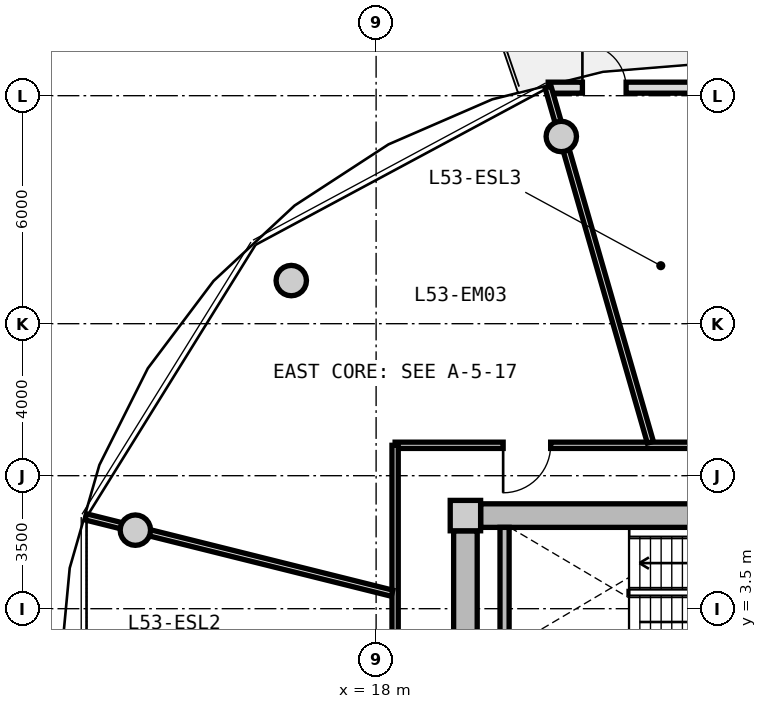
"""IFC4 building model, lengths in metres.
Left out: names, types, materials, properties, quantities, classifications, styles, units other than length and angle.
Written with IfcOpenShell. Run it as: python <this file> out.ifc"""

import sys

from ifc_helpers import new_model, si_unit, direction, frame, frame_2d, origin, origin_2d, place, context, subcontext, project, spatial, rectangle, circle, extrude, source, transform, mapped, element, fill, save


model = new_model("IFC4")
c1 = context("Model", 3, precision=1e-05, world=origin(), true_north=direction((0.0, 1.0)))
c2 = subcontext(c1, "Body", "Model", "MODEL_VIEW")
j1 = project(units=[si_unit("LENGTHUNIT", "METRE"), si_unit("PLANEANGLEUNIT", "RADIAN")], contexts=[c1])
p1 = place(None, origin())
s1 = spatial("IfcSite", under=j1, at=p1, CompositionType="ELEMENT")
p2 = place(p1, origin())
s2 = spatial("IfcBuilding", under=s1, at=p2, CompositionType="ELEMENT")
p3 = place(p2, frame((0.0, 0.0, 170.9)))
s3 = spatial("IfcBuildingStorey", under=s2, at=p3, CompositionType="ELEMENT", Elevation=170.9)
m1 = source(origin(), c2, "Body", "SweptSolid", [
    extrude(rectangle(XDim=0.8, YDim=0.8, at=origin_2d()), origin(), (0.0, 0.0, 1.0), 3.05),
])
p4 = place(p3, frame((20.35, 5.95, 0.0), z_axis=(0.0, 0.0, 1.0), x_axis=(1.0, 0.0, 0.0)))
e1 = element("IfcColumn", 1, at=p4, inside=s3, PredefinedType="COLUMN", context=c2, shape_type="MappedRepresentation", body=[
    mapped(m1, transform((0.0, 0.0, 0.0), x_axis=(1.0, 0.0, 0.0), y_axis=(0.0, 1.0, 0.0), z_axis=(0.0, 0.0, 1.0), scale=1.0)),
])
m2 = source(origin(), c2, "Body", "SweptSolid", [
    extrude(rectangle(XDim=14.5, YDim=0.62, at=frame_2d((7.25, 0.0))), origin(), (0.0, 0.0, 1.0), 2.81),
])
p5 = place(p3, frame((20.75, 5.95, 0.0), z_axis=(0.0, 0.0, 1.0), x_axis=(1.0, 0.0, 0.0)))
e2 = element("IfcWall", 2, at=p5, inside=s3, PredefinedType="SHEAR", context=c2, shape_type="MappedRepresentation", body=[
    mapped(m2, transform((0.0, 0.0, 0.0), x_axis=(1.0, 0.0, 0.0), y_axis=(0.0, 1.0, 0.0), z_axis=(0.0, 0.0, 1.0), scale=1.0)),
])
m3 = source(origin(), c2, "Body", "SweptSolid", [
    extrude(rectangle(XDim=11.1, YDim=0.62, at=frame_2d((5.55, 0.0))), origin(), (0.0, 0.0, 1.0), 2.81),
])
p6 = place(p3, frame((20.35, -5.55, 0.0), z_axis=(0.0, 0.0, 1.0), x_axis=(0.0, 1.0, 0.0)))
e3 = element("IfcWall", 3, at=p6, inside=s3, PredefinedType="SHEAR", context=c2, shape_type="MappedRepresentation", body=[
    mapped(m3, transform((0.0, 0.0, 0.0), x_axis=(1.0, 0.0, 0.0), y_axis=(0.0, 1.0, 0.0), z_axis=(0.0, 0.0, 1.0), scale=1.0)),
])
p7 = place(p6, frame((3.8, 0.0, 0.0)))
e4 = element("IfcOpeningElement", 4, at=p7, cuts=e3, PredefinedType="OPENING", context=c2, shape_type="SweptSolid", body=[
    extrude(rectangle(XDim=1.2, YDim=2.15, at=frame_2d((0.6, 1.075))), frame((0.0, 0.32, 0.0), z_axis=(0.0, -1.0, 0.0), x_axis=(1.0, 0.0, 0.0)), (0.0, 0.0, 1.0), 0.64),
])
m4 = source(origin(), c2, "Body", "SweptSolid", [
    extrude(circle(Radius=0.4, at=origin_2d()), origin(), (0.0, 0.0, 1.0), 3.05),
])
for number, where, z_axis, x_axis in (
    (5, (22.873, 15.926, 0.0), (0.0, 0.0, 1.0), (1.0, 0.0, 0.0)),
    (6, (15.767, 12.135, 0.0), (0.0, 0.0, 1.0), (1.0, 0.0, 0.0)),
    (7, (11.665, 5.567, 0.0), (0.0, 0.0, 1.0), (1.0, 0.0, 0.0)),
):
    element("IfcColumn", number, at=place(p3, frame(where, z_axis=z_axis, x_axis=x_axis)), inside=s3, PredefinedType="COLUMN", context=c2, shape_type="MappedRepresentation", body=[
        mapped(m4, transform((0.0, 0.0, 0.0), x_axis=(1.0, 0.0, 0.0), y_axis=(0.0, 1.0, 0.0), z_axis=(0.0, 0.0, 1.0), scale=1.0)),
    ])
m5 = source(origin(), c2, "Body", "SweptSolid", [
    extrude(rectangle(XDim=8.893, YDim=0.29, at=frame_2d((4.447, 0.0))), origin(), (0.0, 0.0, 1.0), 2.81),
])
p8 = place(p3, frame((22.529, 17.211, 0.0), z_axis=(0.0, 0.0, 1.0), x_axis=(1.0, 0.0, 0.0)))
e8 = element("IfcWall", 8, at=p8, inside=s3, PredefinedType="SOLIDWALL", context=c2, shape_type="MappedRepresentation", body=[
    mapped(m5, transform((0.0, 0.0, 0.0), x_axis=(1.0, 0.0, 0.0), y_axis=(0.0, 1.0, 0.0), z_axis=(0.0, 0.0, 1.0), scale=1.0)),
])
p9 = place(p8, frame((0.9, 0.0, 0.0)))
e9 = element("IfcOpeningElement", 9, at=p9, cuts=e8, PredefinedType="OPENING", context=c2, shape_type="SweptSolid", body=[
    extrude(rectangle(XDim=1.15, YDim=2.25, at=frame_2d((0.575, 1.125))), frame((0.0, 0.155, 0.0), z_axis=(0.0, -1.0, 0.0), x_axis=(1.0, 0.0, 0.0)), (0.0, 0.0, 1.0), 0.31),
])
p10 = place(p8, frame((6.777, 0.0, 0.85)))
e10 = element("IfcOpeningElement", 10, at=p10, cuts=e8, PredefinedType="OPENING", context=c2, shape_type="SweptSolid", body=[
    extrude(rectangle(XDim=1.2, YDim=1.5, at=frame_2d((0.6, 0.75))), frame((0.0, 0.155, 0.0), z_axis=(0.0, -1.0, 0.0), x_axis=(1.0, 0.0, 0.0)), (0.0, 0.0, 1.0), 0.31),
])
m6 = source(origin(), c2, "Body", "SweptSolid", [
    extrude(rectangle(XDim=3.19, YDim=0.24, at=frame_2d((1.595, 0.0))), origin(), (0.0, 0.0, 1.0), 2.81),
])
p11 = place(p3, frame((21.38, 2.45, 0.0), z_axis=(0.0, 0.0, 1.0), x_axis=(0.0, 1.0, 0.0)))
e11 = element("IfcWall", 11, at=p11, inside=s3, PredefinedType="PARTITIONING", context=c2, shape_type="MappedRepresentation", body=[
    mapped(m6, transform((0.0, 0.0, 0.0), x_axis=(1.0, 0.0, 0.0), y_axis=(0.0, 1.0, 0.0), z_axis=(0.0, 0.0, 1.0), scale=1.0)),
])
m7 = source(origin(), c2, "Body", "SweptSolid", [
    extrude(rectangle(XDim=8.58, YDim=0.165, at=frame_2d((4.29, 0.0))), origin(), (0.0, 0.0, 1.0), 2.795),
])
p12 = place(p3, frame((18.5, 7.8, 0.0), z_axis=(0.0, 0.0, 1.0), x_axis=(1.0, 0.0, 0.0)))
e12 = element("IfcWall", 12, at=p12, inside=s3, PredefinedType="PARTITIONING", context=c2, shape_type="MappedRepresentation", body=[
    mapped(m7, transform((0.0, 0.0, 0.0), x_axis=(1.0, 0.0, 0.0), y_axis=(0.0, 1.0, 0.0), z_axis=(0.0, 0.0, 1.0), scale=1.0)),
])
p13 = place(p12, frame((2.843, 0.0, 0.0)))
e13 = element("IfcOpeningElement", 13, at=p13, cuts=e12, PredefinedType="OPENING", context=c2, shape_type="SweptSolid", body=[
    extrude(rectangle(XDim=1.25, YDim=2.2, at=frame_2d((0.625, 1.1))), frame((0.0, 0.093, 0.0), z_axis=(0.0, -1.0, 0.0), x_axis=(1.0, 0.0, 0.0)), (0.0, 0.0, 1.0), 0.185),
])
m8 = source(origin(), c2, "Body", "SweptSolid", [
    extrude(rectangle(XDim=6.88, YDim=0.165, at=frame_2d((3.44, 0.0))), origin(), (0.0, 0.0, 1.0), 2.795),
])
p14 = place(p3, frame((18.5, 0.92, 0.0), z_axis=(0.0, 0.0, 1.0), x_axis=(0.0, 1.0, 0.0)))
e14 = element("IfcWall", 14, at=p14, inside=s3, PredefinedType="PARTITIONING", context=c2, shape_type="MappedRepresentation", body=[
    mapped(m8, transform((0.0, 0.0, 0.0), x_axis=(1.0, 0.0, 0.0), y_axis=(0.0, 1.0, 0.0), z_axis=(0.0, 0.0, 1.0), scale=1.0)),
])
m9 = source(origin(), c2, "Body", "SweptSolid", [
    extrude(rectangle(XDim=9.73, YDim=0.165, at=frame_2d((4.865, 0.0))), origin(), (0.0, 0.0, 1.0), 2.345),
])
p15 = place(p3, frame((25.217, 7.88, 0.0), z_axis=(0.0, 0.0, 1.0), x_axis=(-0.27679492614, 0.960929013436, 0.0)))
e15 = element("IfcWall", 15, at=p15, inside=s3, PredefinedType="PARTITIONING", context=c2, shape_type="MappedRepresentation", body=[
    mapped(m9, transform((0.0, 0.0, 0.0), x_axis=(1.0, 0.0, 0.0), y_axis=(0.0, 1.0, 0.0), z_axis=(0.0, 0.0, 1.0), scale=1.0)),
])
m10 = source(origin(), c2, "Body", "SweptSolid", [
    extrude(rectangle(XDim=8.305, YDim=0.165, at=frame_2d((4.153, 0.0))), origin(), (0.0, 0.0, 1.0), 2.345),
])
p16 = place(p3, frame((18.42, 3.908, 0.0), z_axis=(0.0, 0.0, 1.0), x_axis=(-0.970309994378, 0.241864662175, 0.0)))
e16 = element("IfcWall", 16, at=p16, inside=s3, PredefinedType="PARTITIONING", context=c2, shape_type="MappedRepresentation", body=[
    mapped(m10, transform((0.0, 0.0, 0.0), x_axis=(1.0, 0.0, 0.0), y_axis=(0.0, 1.0, 0.0), z_axis=(0.0, 0.0, 1.0), scale=1.0)),
])
m11 = source(origin(), c2, "Body", "SweptSolid", [
    extrude(rectangle(XDim=1.15, YDim=2.25, at=frame_2d((0.575, 1.125))), frame((0.0, 0.025, 0.0), z_axis=(0.0, -1.0, 0.0), x_axis=(1.0, 0.0, 0.0)), (0.0, 0.0, 1.0), 0.05),
])
p17 = place(p9, origin())
e17 = element("IfcDoor", 17, at=p17, inside=s3, OperationType="SINGLE_SWING_LEFT", PredefinedType="DOOR", context=c2, shape_type="MappedRepresentation", body=[
    mapped(m11, transform((0.0, 0.0, 0.0), x_axis=(1.0, 0.0, 0.0), y_axis=(0.0, 1.0, 0.0), z_axis=(0.0, 0.0, 1.0), scale=1.0)),
])
fill(e9, e17)
m12 = source(origin(), c2, "Body", "SweptSolid", [
    extrude(rectangle(XDim=1.25, YDim=2.2, at=frame_2d((0.625, 1.1))), frame((0.0, 0.025, 0.0), z_axis=(0.0, -1.0, 0.0), x_axis=(1.0, 0.0, 0.0)), (0.0, 0.0, 1.0), 0.05),
])
p18 = place(p13, frame((1.25, 0.0, 0.0), z_axis=(0.0, 0.0, 1.0), x_axis=(-1.0, 0.0, 0.0)))
e18 = element("IfcDoor", 18, at=p18, inside=s3, OperationType="SINGLE_SWING_RIGHT", PredefinedType="DOOR", context=c2, shape_type="MappedRepresentation", body=[
    mapped(m12, transform((0.0, 0.0, 0.0), x_axis=(1.0, 0.0, 0.0), y_axis=(0.0, 1.0, 0.0), z_axis=(0.0, 0.0, 1.0), scale=1.0)),
])
fill(e13, e18)
save(model, sys.argv[1])
